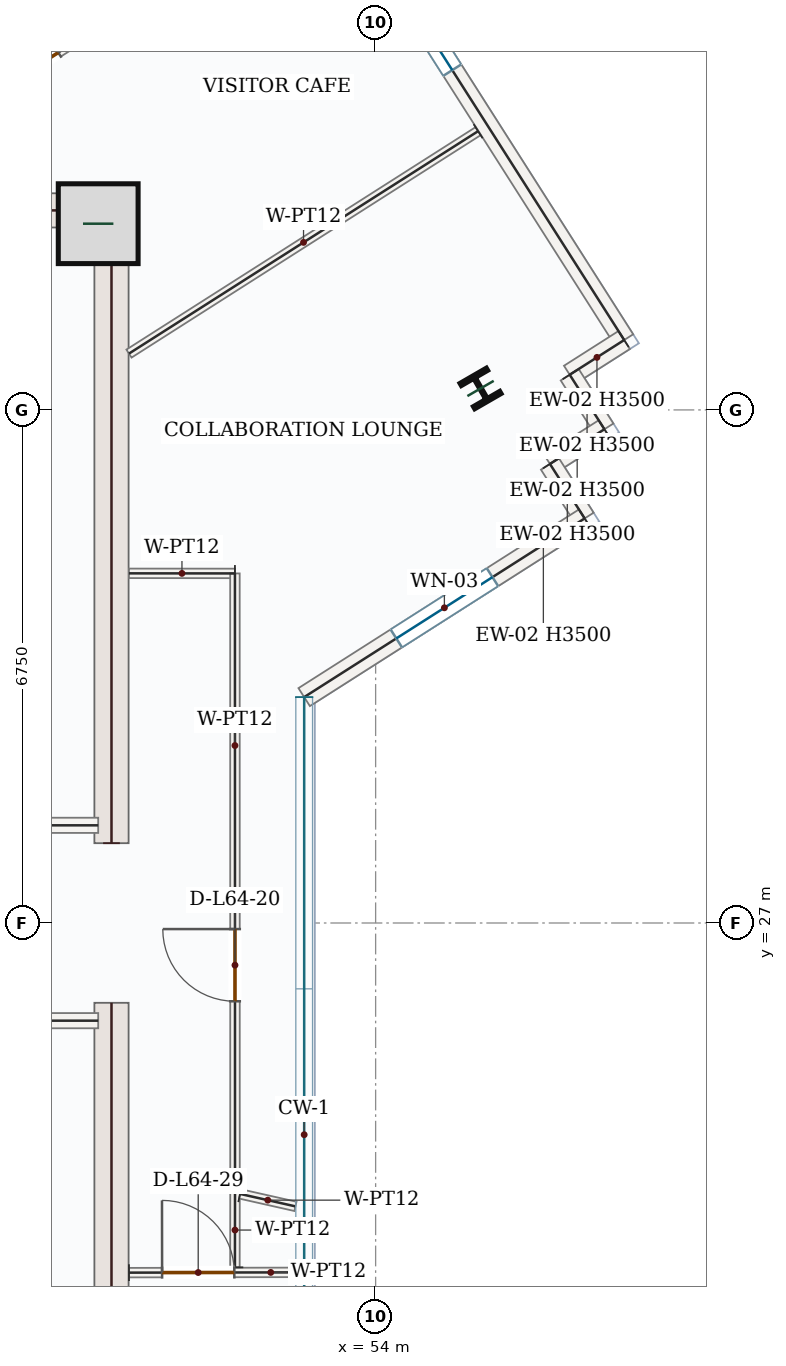
"""IFC4 building model, lengths in metres.
Left out: names, types, materials, properties, quantities, classifications, styles, units other than length and angle.
Written with IfcOpenShell. Run it as: python <this file> out.ifc"""

import sys

from ifc_helpers import new_model, si_unit, direction, frame, frame_2d, origin, origin_2d, place, context, subcontext, project, spatial, rectangle, i_section, extrude, source, transform, mapped, element, fill, save


model = new_model("IFC4")
c1 = context("Model", 3, precision=1e-05, world=origin(), true_north=direction((0.0, 1.0)))
c2 = subcontext(c1, "Body", "Model", "MODEL_VIEW")
j1 = project(units=[si_unit("LENGTHUNIT", "METRE"), si_unit("PLANEANGLEUNIT", "RADIAN")], contexts=[c1])
p1 = place(None, origin())
s1 = spatial("IfcSite", under=j1, at=p1, CompositionType="ELEMENT")
p2 = place(p1, origin())
s2 = spatial("IfcBuilding", under=s1, at=p2, CompositionType="ELEMENT")
p3 = place(p2, frame((0.0, 0.0, 269.1)))
s3 = spatial("IfcBuildingStorey", under=s2, at=p3, CompositionType="ELEMENT", Elevation=269.1)
m1 = source(origin(), c2, "Body", "SweptSolid", [
    extrude(rectangle(XDim=8.55, YDim=0.45, at=frame_2d((4.275, 0.0))), origin(), (0.0, 0.0, 1.0), 3.5),
])
for number, where, z_axis, x_axis in (
    (1, (50.525, 17.4, 0.0), (0.0, 0.0, 1.0), (0.0, 1.0, 0.0)),
    (2, (50.525, 28.05, 0.0), (0.0, 0.0, 1.0), (0.0, 1.0, 0.0)),
):
    element("IfcWall", number, at=place(p3, frame(where, z_axis=z_axis, x_axis=x_axis)), inside=s3, PredefinedType="SHEAR", context=c2, shape_type="MappedRepresentation", body=[
        mapped(m1, transform((0.0, 0.0, 0.0), x_axis=(1.0, 0.0, 0.0), y_axis=(0.0, 1.0, 0.0), z_axis=(0.0, 0.0, 1.0), scale=1.0)),
    ])
m2 = source(origin(), c2, "Body", "SweptSolid", [
    extrude(rectangle(XDim=7.1, YDim=0.45, at=frame_2d((3.55, 0.0))), origin(), (0.0, 0.0, 1.0), 3.5),
])
p4 = place(p3, frame((43.2, 36.375, 0.0), z_axis=(0.0, 0.0, 1.0), x_axis=(1.0, 0.0, 0.0)))
e3 = element("IfcWall", 3, at=p4, inside=s3, PredefinedType="SHEAR", context=c2, shape_type="MappedRepresentation", body=[
    mapped(m2, transform((0.0, 0.0, 0.0), x_axis=(1.0, 0.0, 0.0), y_axis=(0.0, 1.0, 0.0), z_axis=(0.0, 0.0, 1.0), scale=1.0)),
])
m3 = source(origin(), c2, "Body", "SweptSolid", [
    extrude(rectangle(XDim=1.05, YDim=1.05, at=origin_2d()), origin(), (0.0, 0.0, 1.0), 3.75),
])
p5 = place(p3, frame((50.35, 36.2, 0.0), z_axis=(0.0, 0.0, 1.0), x_axis=(1.0, 0.0, 0.0)))
e4 = element("IfcColumn", 4, at=p5, inside=s3, PredefinedType="COLUMN", context=c2, shape_type="MappedRepresentation", body=[
    mapped(m3, transform((0.0, 0.0, 0.0), x_axis=(1.0, 0.0, 0.0), y_axis=(0.0, 1.0, 0.0), z_axis=(0.0, 0.0, 1.0), scale=1.0)),
])
m4 = source(origin(), c2, "Body", "SweptSolid", [
    extrude(i_section(OverallWidth=0.399, OverallDepth=0.386, WebThickness=0.021, FlangeThickness=0.033, FilletRadius=0.018, at=origin_2d()), origin(), (0.0, 0.0, 1.0), 3.75),
])
p6 = place(p3, frame((55.38, 34.032, 0.0), z_axis=(0.0, 0.0, 1.0), x_axis=(0.866025403784, 0.5, 0.0)))
e5 = element("IfcColumn", 5, at=p6, inside=s3, PredefinedType="COLUMN", context=c2, shape_type="MappedRepresentation", body=[
    mapped(m4, transform((0.0, 0.0, 0.0), x_axis=(1.0, 0.0, 0.0), y_axis=(0.0, 1.0, 0.0), z_axis=(0.0, 0.0, 1.0), scale=1.0)),
])
p7 = place(p3, frame((51.94, 43.036, 0.0), z_axis=(0.0, 0.0, 1.0), x_axis=(0.537314949054, -0.843381672508, 0.0)))
e6 = element("IfcWall", 6, at=p7, inside=s3, PredefinedType="SOLIDWALL", context=c2, shape_type="SweptSolid", body=[
    extrude(rectangle(XDim=9.92, YDim=0.28, at=frame_2d((4.96, 0.0))), origin(), (0.0, 0.0, 1.0), 3.5),
])
p8 = place(p7, frame((4.21, 0.0, 0.85)))
e7 = element("IfcOpeningElement", 7, at=p8, cuts=e6, PredefinedType="OPENING", context=c2, shape_type="SweptSolid", body=[
    extrude(rectangle(XDim=1.5, YDim=1.5, at=frame_2d((0.75, 0.75))), frame((0.0, 0.15, 0.0), z_axis=(0.0, -1.0, 0.0), x_axis=(1.0, 0.0, 0.0)), (0.0, 0.0, 1.0), 0.3),
])
m5 = source(origin(), c2, "Body", "SweptSolid", [
    extrude(rectangle(XDim=0.85, YDim=0.28, at=frame_2d((0.425, 0.0))), origin(), (0.0, 0.0, 1.0), 3.5),
])
p9 = place(p3, frame((57.27, 34.67, 0.0), z_axis=(0.0, 0.0, 1.0), x_axis=(-0.843401251716, -0.537284215853, 0.0)))
e8 = element("IfcWall", 8, at=p9, inside=s3, PredefinedType="SOLIDWALL", context=c2, shape_type="MappedRepresentation", body=[
    mapped(m5, transform((0.0, 0.0, 0.0), x_axis=(1.0, 0.0, 0.0), y_axis=(0.0, 1.0, 0.0), z_axis=(0.0, 0.0, 1.0), scale=1.0)),
])
m6 = source(origin(), c2, "Body", "SweptSolid", [
    extrude(rectangle(XDim=0.85, YDim=0.28, at=frame_2d((0.425, 0.0))), origin(), (0.0, 0.0, 1.0), 3.5),
])
for number, where, z_axis, x_axis in (
    (9, (56.553, 34.213, 0.0), (0.0, 0.0, 1.0), (0.537, -0.843, 0.0)),
    (10, (57.01, 33.496, 0.0), (0.0, 0.0, 1.0), (-0.843, -0.537, 0.0)),
    (11, (56.293, 33.039, 0.0), (0.0, 0.0, 1.0), (0.537, -0.843, 0.0)),
):
    element("IfcWall", number, at=place(p3, frame(where, z_axis=z_axis, x_axis=x_axis)), inside=s3, PredefinedType="SOLIDWALL", context=c2, shape_type="MappedRepresentation", body=[
        mapped(m6, transform((0.0, 0.0, 0.0), x_axis=(1.0, 0.0, 0.0), y_axis=(0.0, 1.0, 0.0), z_axis=(0.0, 0.0, 1.0), scale=1.0)),
    ])
p10 = place(p3, frame((56.75, 32.323, 0.0), z_axis=(0.0, 0.0, 1.0), x_axis=(-0.843383352012, -0.537312312857, 0.0)))
e12 = element("IfcWall", 12, at=p10, inside=s3, PredefinedType="SOLIDWALL", context=c2, shape_type="SweptSolid", body=[
    extrude(rectangle(XDim=4.375, YDim=0.28, at=frame_2d((2.188, 0.0))), origin(), (0.0, 0.0, 1.0), 3.5),
])
p11 = place(p10, frame((1.438, 0.0, 0.85)))
e13 = element("IfcOpeningElement", 13, at=p11, cuts=e12, PredefinedType="OPENING", context=c2, shape_type="SweptSolid", body=[
    extrude(rectangle(XDim=1.5, YDim=1.5, at=frame_2d((0.75, 0.75))), frame((0.0, 0.15, 0.0), z_axis=(0.0, -1.0, 0.0), x_axis=(1.0, 0.0, 0.0)), (0.0, 0.0, 1.0), 0.3),
])
m7 = source(origin(), c2, "Body", "SweptSolid", [
    extrude(rectangle(XDim=4.25, YDim=0.2, at=frame_2d((2.125, 0.0))), origin(), (0.0, 0.0, 1.0), 3.5),
])
for number, where, z_axis, x_axis in (
    (14, (46.1, 25.715, 0.0), (0.0, 0.0, 1.0), (1.0, 0.0, 0.0)),
    (15, (46.1, 28.285, 0.0), (0.0, 0.0, 1.0), (1.0, 0.0, 0.0)),
):
    element("IfcWall", number, at=place(p3, frame(where, z_axis=z_axis, x_axis=x_axis)), inside=s3, PredefinedType="SOLIDWALL", context=c2, shape_type="MappedRepresentation", body=[
        mapped(m7, transform((0.0, 0.0, 0.0), x_axis=(1.0, 0.0, 0.0), y_axis=(0.0, 1.0, 0.0), z_axis=(0.0, 0.0, 1.0), scale=1.0)),
    ])
p12 = place(p3, frame((46.927, 36.605, 0.0), z_axis=(0.0, 0.0, 1.0), x_axis=(0.843398332862, 0.537288797693, 0.0)))
e16 = element("IfcWall", 16, at=p12, inside=s3, PredefinedType="PARTITIONING", context=c2, shape_type="SweptSolid", body=[
    extrude(rectangle(XDim=5.924, YDim=0.125, at=frame_2d((2.962, 0.0))), origin(), (0.0, 0.0, 1.0), 3.5),
])
p13 = place(p12, frame((2.487, 0.0, 0.0)))
e17 = element("IfcOpeningElement", 17, at=p13, cuts=e16, PredefinedType="OPENING", context=c2, shape_type="SweptSolid", body=[
    extrude(rectangle(XDim=0.95, YDim=2.15, at=frame_2d((0.475, 1.075))), frame((0.0, 0.073, 0.0), z_axis=(0.0, -1.0, 0.0), x_axis=(1.0, 0.0, 0.0)), (0.0, 0.0, 1.0), 0.145),
])
m8 = source(origin(), c2, "Body", "SweptSolid", [
    extrude(rectangle(XDim=5.446, YDim=0.125, at=frame_2d((2.723, 0.0))), origin(), (0.0, 0.0, 1.0), 3.5),
])
p14 = place(p3, frame((55.348, 37.417, 0.0), z_axis=(0.0, 0.0, 1.0), x_axis=(-0.843395566027, -0.537293140851, 0.0)))
e18 = element("IfcWall", 18, at=p14, inside=s3, PredefinedType="PARTITIONING", context=c2, shape_type="MappedRepresentation", body=[
    mapped(m8, transform((0.0, 0.0, 0.0), x_axis=(1.0, 0.0, 0.0), y_axis=(0.0, 1.0, 0.0), z_axis=(0.0, 0.0, 1.0), scale=1.0)),
])
p15 = place(p3, frame((50.755, 22.4, 0.0), z_axis=(0.0, 0.0, 1.0), x_axis=(0.999998787702, 0.001557110781, 0.0)))
e19 = element("IfcWall", 19, at=p15, inside=s3, PredefinedType="PARTITIONING", context=c2, shape_type="SweptSolid", body=[
    extrude(rectangle(XDim=2.195, YDim=0.125, at=frame_2d((1.098, 0.0))), origin(), (0.0, 0.0, 1.0), 3.5),
])
p16 = place(p15, frame((0.436, 0.0, 0.0)))
e20 = element("IfcOpeningElement", 20, at=p16, cuts=e19, PredefinedType="OPENING", context=c2, shape_type="SweptSolid", body=[
    extrude(rectangle(XDim=0.95, YDim=2.15, at=frame_2d((0.475, 1.075))), frame((0.0, 0.073, 0.0), z_axis=(0.0, -1.0, 0.0), x_axis=(1.0, 0.0, 0.0)), (0.0, 0.0, 1.0), 0.145),
])
m9 = source(origin(), c2, "Body", "SweptSolid", [
    extrude(rectangle(XDim=0.981, YDim=0.125, at=frame_2d((0.491, 0.0))), origin(), (0.0, 0.0, 1.0), 3.5),
])
p17 = place(p3, frame((52.149, 22.47, 0.0), z_axis=(0.0, 0.0, 1.0), x_axis=(0.001244089607, 0.99999922612, 0.0)))
e21 = element("IfcWall", 21, at=p17, inside=s3, PredefinedType="PARTITIONING", context=c2, shape_type="MappedRepresentation", body=[
    mapped(m9, transform((0.0, 0.0, 0.0), x_axis=(1.0, 0.0, 0.0), y_axis=(0.0, 1.0, 0.0), z_axis=(0.0, 0.0, 1.0), scale=1.0)),
])
m10 = source(origin(), c2, "Body", "SweptSolid", [
    extrude(rectangle(XDim=0.746, YDim=0.125, at=frame_2d((0.373, 0.0))), origin(), (0.0, 0.0, 1.0), 3.5),
])
p18 = place(p3, frame((52.218, 23.436, 0.0), z_axis=(0.0, 0.0, 1.0), x_axis=(0.975574688732, -0.219667991993, 0.0)))
e22 = element("IfcWall", 22, at=p18, inside=s3, PredefinedType="PARTITIONING", context=c2, shape_type="MappedRepresentation", body=[
    mapped(m10, transform((0.0, 0.0, 0.0), x_axis=(1.0, 0.0, 0.0), y_axis=(0.0, 1.0, 0.0), z_axis=(0.0, 0.0, 1.0), scale=1.0)),
])
m11 = source(origin(), c2, "Body", "SweptSolid", [
    extrude(rectangle(XDim=1.394, YDim=0.125, at=frame_2d((0.697, 0.0))), origin(), (0.0, 0.0, 1.0), 3.5),
])
p19 = place(p3, frame((52.149, 31.599, 0.0), z_axis=(0.0, 0.0, 1.0), x_axis=(-0.999999754632, 0.000700525222, 0.0)))
e23 = element("IfcWall", 23, at=p19, inside=s3, PredefinedType="PARTITIONING", context=c2, shape_type="MappedRepresentation", body=[
    mapped(m11, transform((0.0, 0.0, 0.0), x_axis=(1.0, 0.0, 0.0), y_axis=(0.0, 1.0, 0.0), z_axis=(0.0, 0.0, 1.0), scale=1.0)),
])
p20 = place(p3, frame((52.15, 23.451, 0.0), z_axis=(0.0, 0.0, 1.0), x_axis=(-0.000119850186, 0.999999992818, 0.0)))
e24 = element("IfcWall", 24, at=p20, inside=s3, PredefinedType="PARTITIONING", context=c2, shape_type="SweptSolid", body=[
    extrude(rectangle(XDim=8.148, YDim=0.125, at=frame_2d((4.074, 0.0))), origin(), (0.0, 0.0, 1.0), 3.5),
])
p21 = place(p20, frame((2.519, 0.0, 0.0)))
e25 = element("IfcOpeningElement", 25, at=p21, cuts=e24, PredefinedType="OPENING", context=c2, shape_type="SweptSolid", body=[
    extrude(rectangle(XDim=0.95, YDim=2.15, at=frame_2d((0.475, 1.075))), frame((0.0, 0.073, 0.0), z_axis=(0.0, -1.0, 0.0), x_axis=(1.0, 0.0, 0.0)), (0.0, 0.0, 1.0), 0.145),
])
m12 = source(origin(), c2, "Body", "SweptSolid", [
    extrude(rectangle(XDim=1.5, YDim=1.5, at=frame_2d((0.75, 0.75))), frame((0.0, 0.03, 0.0), z_axis=(0.0, -1.0, 0.0), x_axis=(1.0, 0.0, 0.0)), (0.0, 0.0, 1.0), 0.06),
])
p22 = place(p8, origin())
e26 = element("IfcWindow", 26, at=p22, inside=s3, PartitioningType="SINGLE_PANEL", PredefinedType="WINDOW", context=c2, shape_type="MappedRepresentation", body=[
    mapped(m12, transform((0.0, 0.0, 0.0), x_axis=(1.0, 0.0, 0.0), y_axis=(0.0, 1.0, 0.0), z_axis=(0.0, 0.0, 1.0), scale=1.0)),
])
fill(e7, e26)
p23 = place(p11, origin())
e27 = element("IfcWindow", 27, at=p23, inside=s3, PartitioningType="SINGLE_PANEL", PredefinedType="WINDOW", context=c2, shape_type="MappedRepresentation", body=[
    mapped(m12, transform((0.0, 0.0, 0.0), x_axis=(1.0, 0.0, 0.0), y_axis=(0.0, 1.0, 0.0), z_axis=(0.0, 0.0, 1.0), scale=1.0)),
])
fill(e13, e27)
m13 = source(origin(), c2, "Body", "SweptSolid", [
    extrude(rectangle(XDim=0.95, YDim=2.15, at=frame_2d((0.475, 1.075))), frame((0.0, 0.025, 0.0), z_axis=(0.0, -1.0, 0.0), x_axis=(1.0, 0.0, 0.0)), (0.0, 0.0, 1.0), 0.05),
])
p24 = place(p21, origin())
e28 = element("IfcDoor", 28, at=p24, inside=s3, OperationType="SINGLE_SWING_RIGHT", PredefinedType="DOOR", context=c2, shape_type="MappedRepresentation", body=[
    mapped(m13, transform((0.0, 0.0, 0.0), x_axis=(1.0, 0.0, 0.0), y_axis=(0.0, 1.0, 0.0), z_axis=(0.0, 0.0, 1.0), scale=1.0)),
])
fill(e25, e28)
p25 = place(p16, origin())
e29 = element("IfcDoor", 29, at=p25, inside=s3, OperationType="SINGLE_SWING_LEFT", PredefinedType="DOOR", context=c2, shape_type="MappedRepresentation", body=[
    mapped(m13, transform((0.0, 0.0, 0.0), x_axis=(1.0, 0.0, 0.0), y_axis=(0.0, 1.0, 0.0), z_axis=(0.0, 0.0, 1.0), scale=1.0)),
])
fill(e20, e29)
p26 = place(p13, origin())
e30 = element("IfcDoor", 30, at=p26, inside=s3, OperationType="SINGLE_SWING_LEFT", PredefinedType="DOOR", context=c2, shape_type="MappedRepresentation", body=[
    mapped(m13, transform((0.0, 0.0, 0.0), x_axis=(1.0, 0.0, 0.0), y_axis=(0.0, 1.0, 0.0), z_axis=(0.0, 0.0, 1.0), scale=1.0)),
])
fill(e17, e30)
save(model, sys.argv[1])
